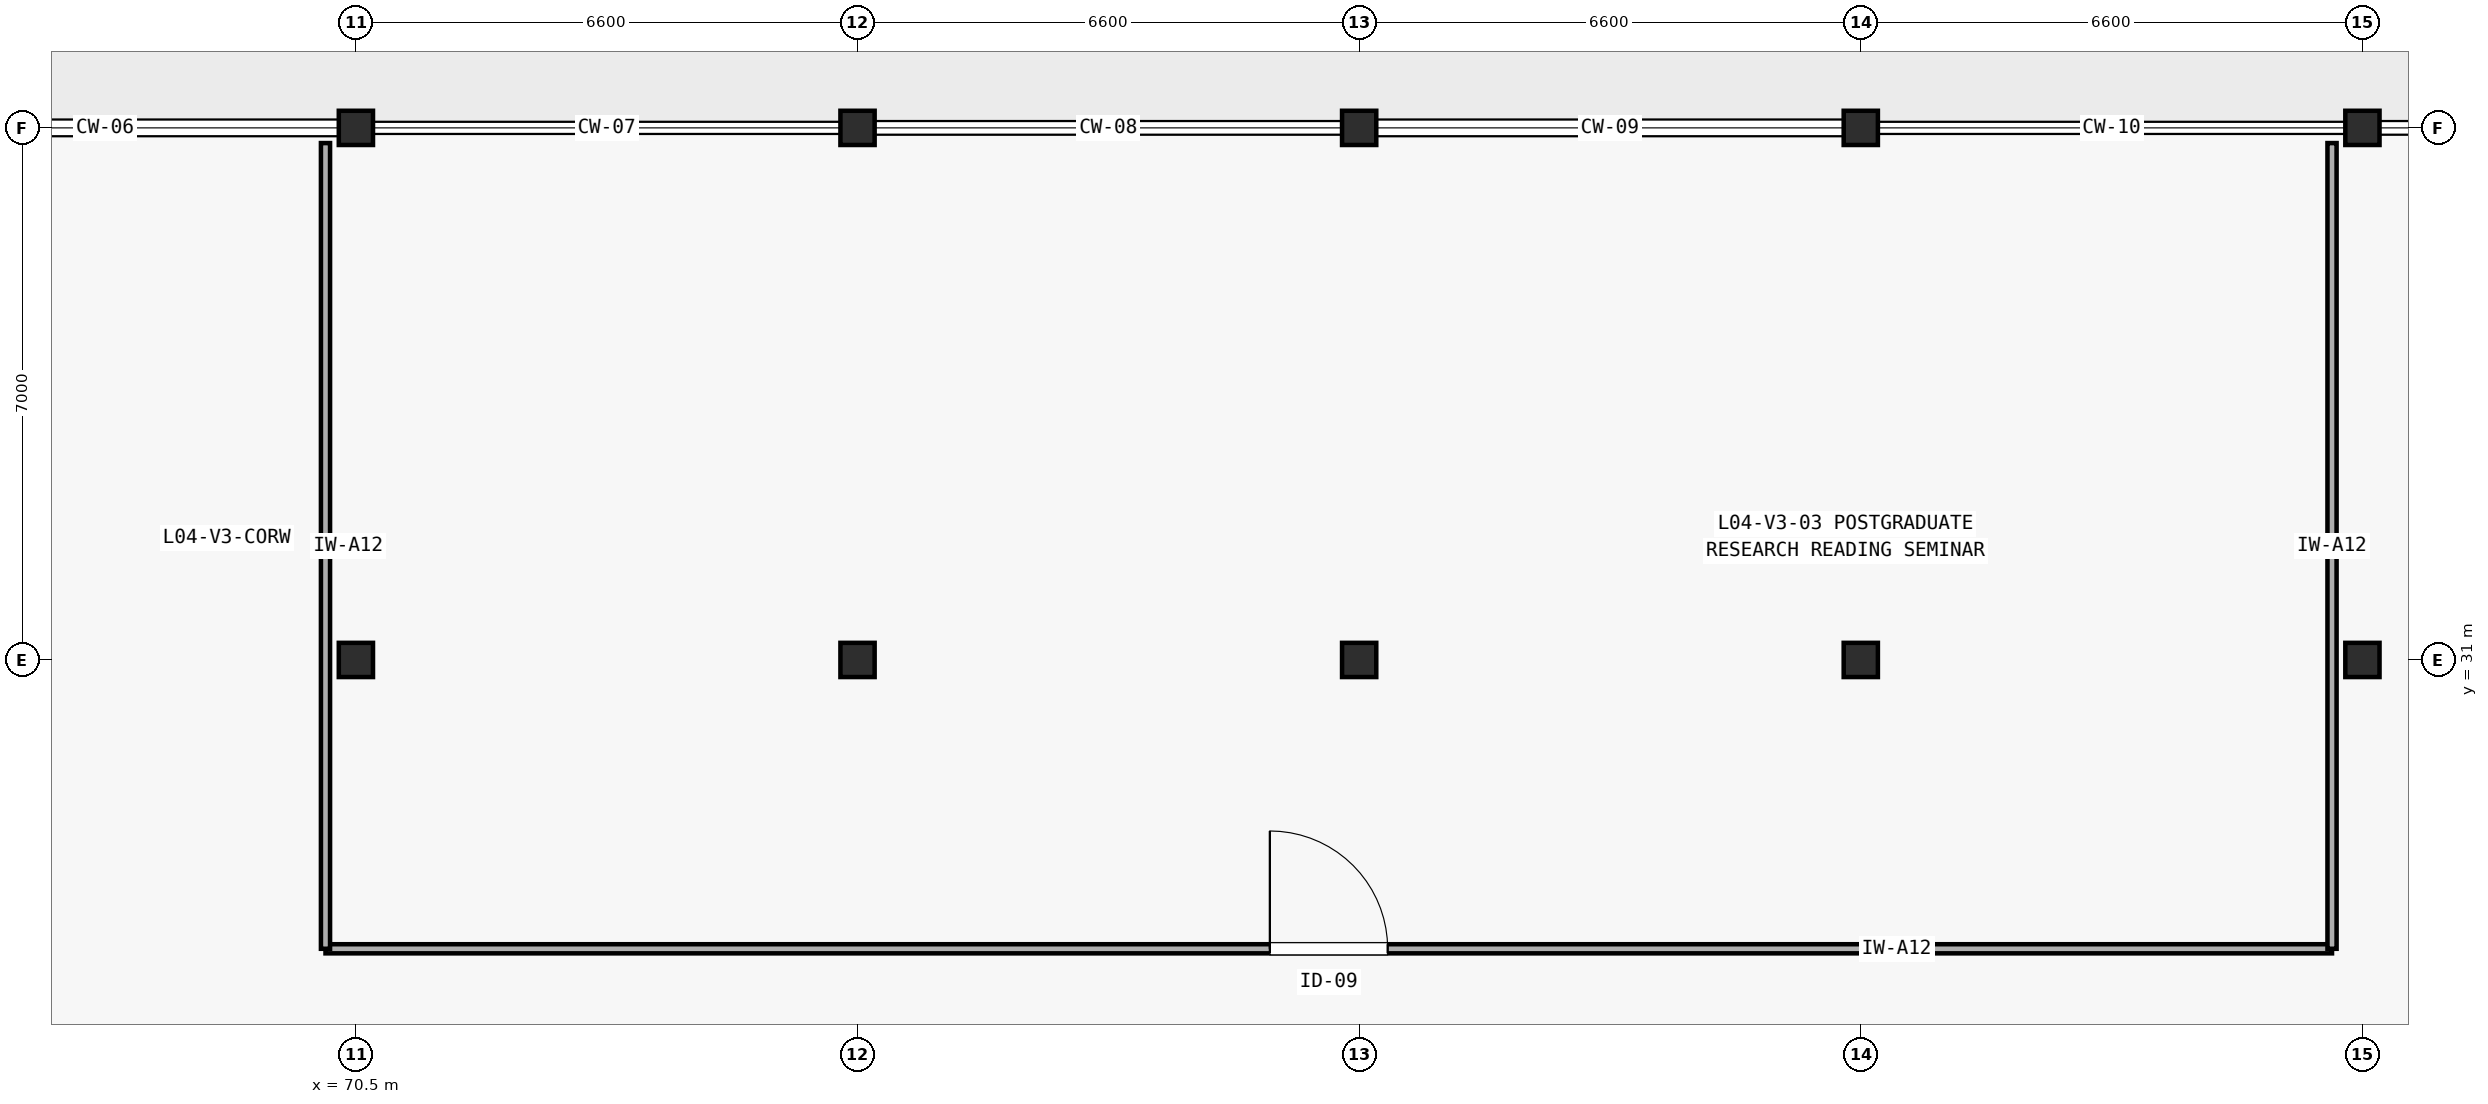
"""IFC4 building model, lengths in metres.
Left out: names, types, materials, properties, quantities, classifications, styles, units other than length and angle.
Written with IfcOpenShell. Run it as: python <this file> out.ifc"""

import sys

from ifc_helpers import new_model, si_unit, direction, frame, frame_2d, origin, origin_2d, place, context, subcontext, project, spatial, rectangle, extrude, element, fill, save


model = new_model("IFC4")
c1 = context("Model", 3, precision=1e-05, world=origin(), true_north=direction((0.0, 1.0)))
c2 = subcontext(c1, "Body", "Model", "MODEL_VIEW")
j1 = project(units=[si_unit("LENGTHUNIT", "METRE"), si_unit("PLANEANGLEUNIT", "RADIAN")], contexts=[c1])
p1 = place(None, origin())
s1 = spatial("IfcSite", under=j1, at=p1, CompositionType="ELEMENT")
p2 = place(p1, origin())
s2 = spatial("IfcBuilding", under=s1, at=p2, CompositionType="ELEMENT")
p3 = place(p2, frame((0.0, 0.0, 16.8)))
s3 = spatial("IfcBuildingStorey", under=s2, at=p3, CompositionType="ELEMENT", Elevation=16.8)
for number, where, z_axis, x_axis in (
    (1, (70.5, 31.0, 0.0), (0.0, 0.0, 1.0), (1.0, 0.0, 0.0)),
    (2, (70.5, 38.0, 0.0), (0.0, 0.0, 1.0), (1.0, 0.0, 0.0)),
    (3, (77.1, 31.0, 0.0), (0.0, 0.0, 1.0), (1.0, 0.0, 0.0)),
    (4, (77.1, 38.0, 0.0), (0.0, 0.0, 1.0), (1.0, 0.0, 0.0)),
    (5, (83.7, 31.0, 0.0), (0.0, 0.0, 1.0), (1.0, 0.0, 0.0)),
    (6, (83.7, 38.0, 0.0), (0.0, 0.0, 1.0), (1.0, 0.0, 0.0)),
    (7, (90.3, 31.0, 0.0), (0.0, 0.0, 1.0), (1.0, 0.0, 0.0)),
    (8, (90.3, 38.0, 0.0), (0.0, 0.0, 1.0), (1.0, 0.0, 0.0)),
    (9, (96.9, 31.0, 0.0), (0.0, 0.0, 1.0), (1.0, 0.0, 0.0)),
    (10, (96.9, 38.0, 0.0), (0.0, 0.0, 1.0), (1.0, 0.0, 0.0)),
):
    element("IfcColumn", number, at=place(p3, frame(where, z_axis=z_axis, x_axis=x_axis)), inside=s3, PredefinedType="COLUMN", context=c2, shape_type="SweptSolid", body=[
        extrude(rectangle(XDim=0.45, YDim=0.45, at=origin_2d()), origin(), (0.0, 0.0, 1.0), 4.2),
    ])
p4 = place(p3, frame((70.1, 27.2, 0.0), z_axis=(0.0, 0.0, 1.0), x_axis=(1.0, 0.0, 0.0)))
e11 = element("IfcWall", 11, at=p4, inside=s3, PredefinedType="PARTITIONING", context=c2, shape_type="SweptSolid", body=[
    extrude(rectangle(XDim=26.4, YDim=0.12, at=frame_2d((13.2, 0.0))), origin(), (0.0, 0.0, 1.0), 3.9),
])
p5 = place(p4, frame((12.425, 0.0, 0.0)))
e12 = element("IfcOpeningElement", 12, at=p5, cuts=e11, PredefinedType="OPENING", context=c2, shape_type="SweptSolid", body=[
    extrude(rectangle(XDim=1.55, YDim=2.2, at=frame_2d((0.775, 1.1))), frame((0.0, 0.07, 0.0), z_axis=(0.0, -1.0, 0.0), x_axis=(1.0, 0.0, 0.0)), (0.0, 0.0, 1.0), 0.14),
])
for number, where, z_axis, x_axis in (
    (13, (70.1, 27.2, 0.0), (0.0, 0.0, 1.0), (0.0, 1.0, 0.0)),
    (14, (96.5, 27.2, 0.0), (0.0, 0.0, 1.0), (0.0, 1.0, 0.0)),
):
    element("IfcWall", number, at=place(p3, frame(where, z_axis=z_axis, x_axis=x_axis)), inside=s3, PredefinedType="PARTITIONING", context=c2, shape_type="SweptSolid", body=[
        extrude(rectangle(XDim=10.6, YDim=0.12, at=frame_2d((5.3, 0.0))), origin(), (0.0, 0.0, 1.0), 3.9),
    ])
p6 = place(p5, origin())
e15 = element("IfcDoor", 15, at=p6, inside=s3, OperationType="SINGLE_SWING_LEFT", PredefinedType="DOOR", context=c2, shape_type="SweptSolid", body=[
    extrude(rectangle(XDim=1.55, YDim=2.2, at=frame_2d((0.775, 1.1))), frame((0.0, 0.025, 0.0), z_axis=(0.0, -1.0, 0.0), x_axis=(1.0, 0.0, 0.0)), (0.0, 0.0, 1.0), 0.05),
])
fill(e12, e15)
save(model, sys.argv[1])
